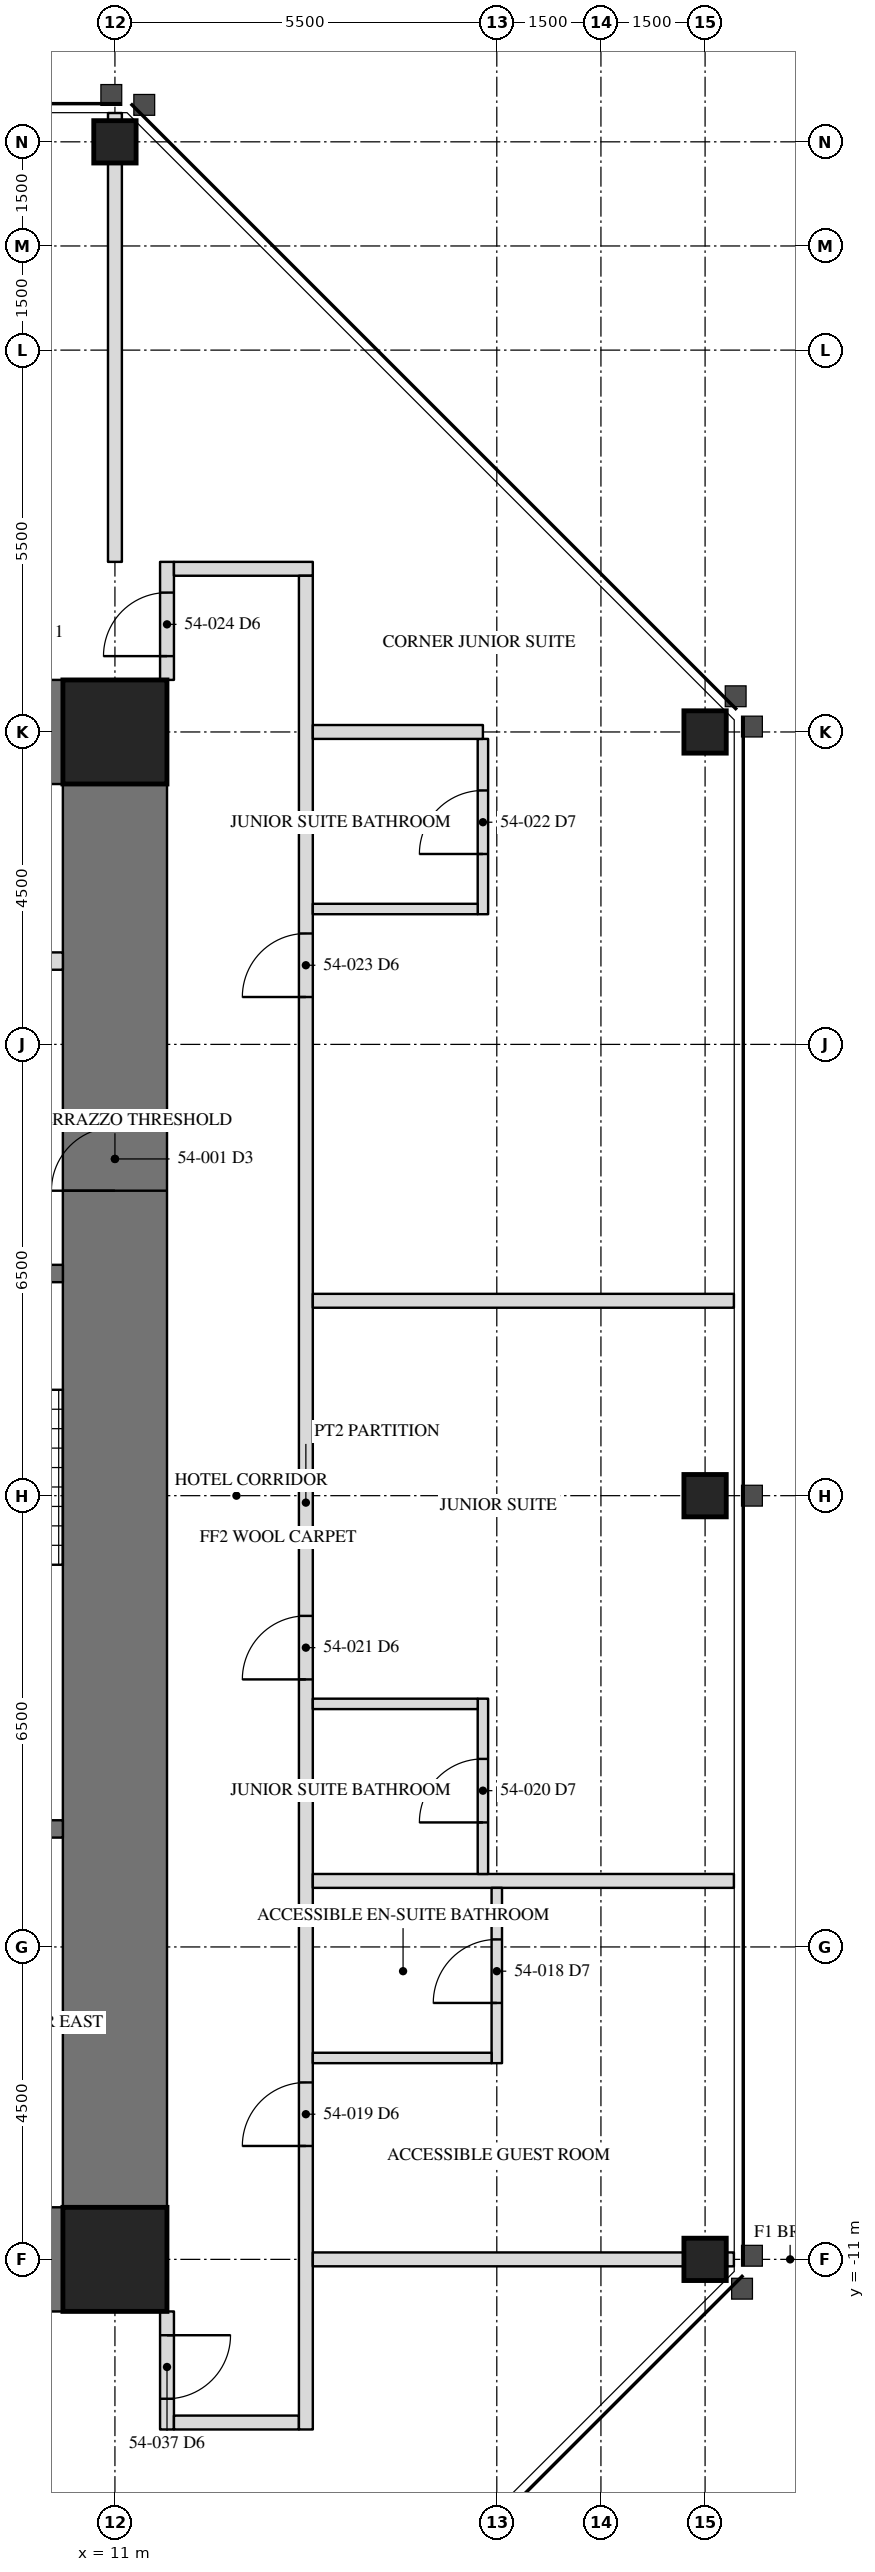
"""IFC4 building model, lengths in metres.
Left out: names, types, materials, properties, quantities, classifications, styles, units other than length and angle.
Written with IfcOpenShell. Run it as: python <this file> out.ifc"""

import sys

from ifc_helpers import new_model, si_unit, direction, frame, frame_2d, origin, origin_2d, place, context, subcontext, project, spatial, rectangle, hollow_rectangle, extrude, element, fill, save


model = new_model("IFC4")
c1 = context("Model", 3, precision=1e-05, world=origin(), true_north=direction((0.0, 1.0)))
c2 = subcontext(c1, "Body", "Model", "MODEL_VIEW")
j1 = project(units=[si_unit("LENGTHUNIT", "METRE"), si_unit("PLANEANGLEUNIT", "RADIAN")], contexts=[c1])
p1 = place(None, origin())
s1 = spatial("IfcSite", under=j1, at=p1, CompositionType="ELEMENT")
p2 = place(p1, origin())
s2 = spatial("IfcBuilding", under=s1, at=p2, CompositionType="ELEMENT")
p3 = place(p2, frame((0.0, 0.0, 225.7)))
s3 = spatial("IfcBuildingStorey", under=s2, at=p3, CompositionType="ELEMENT", Elevation=225.7)
for number, where, z_axis, x_axis in (
    (1, (19.5, -11.0, 0.0), (0.0, 0.0, 1.0), (0.0, 1.0, 0.0)),
    (2, (19.5, 0.0, 0.0), (0.0, 0.0, 1.0), (0.0, 1.0, 0.0)),
    (3, (19.5, 11.0, 0.0), (0.0, 0.0, 1.0), (0.0, 1.0, 0.0)),
    (4, (11.0, 19.5, 0.0), (0.0, 0.0, 1.0), (1.0, 0.0, 0.0)),
):
    element("IfcColumn", number, at=place(p3, frame(where, z_axis=z_axis, x_axis=x_axis)), inside=s3, PredefinedType="COLUMN", context=c2, shape_type="SweptSolid", body=[
        extrude(hollow_rectangle(XDim=0.61, YDim=0.61, WallThickness=0.076, at=origin_2d()), origin(), (0.0, 0.0, 1.0), 3.5),
    ])
p4 = place(p3, frame((11.0, -11.0, 0.0), z_axis=(0.0, 0.0, 1.0), x_axis=(0.0, 1.0, 0.0)))
e5 = element("IfcWall", 5, at=p4, inside=s3, PredefinedType="SHEAR", context=c2, shape_type="SweptSolid", body=[
    extrude(rectangle(XDim=22.0, YDim=1.5, at=frame_2d((11.0, 0.0))), origin(), (0.0, 0.0, 1.0), 3.5),
])
p5 = place(p4, frame((15.393, 0.0, 0.0)))
e6 = element("IfcOpeningElement", 6, at=p5, cuts=e5, PredefinedType="OPENING", context=c2, shape_type="SweptSolid", body=[
    extrude(rectangle(XDim=0.915, YDim=2.134, at=frame_2d((0.458, 1.067))), frame((0.0, 0.76, 0.0), z_axis=(0.0, -1.0, 0.0), x_axis=(1.0, 0.0, 0.0)), (0.0, 0.0, 1.0), 1.52),
])
for number, where, z_axis, x_axis in (
    (7, (11.0, 11.0, 0.0), (0.0, 0.0, 1.0), (-1.0, 0.0, 0.0)),
    (8, (6.5, -11.0, 0.0), (0.0, 0.0, 1.0), (1.0, 0.0, 0.0)),
):
    element("IfcWall", number, at=place(p3, frame(where, z_axis=z_axis, x_axis=x_axis)), inside=s3, PredefinedType="SHEAR", context=c2, shape_type="SweptSolid", body=[
        extrude(rectangle(XDim=4.5, YDim=1.5, at=frame_2d((2.25, 0.0))), origin(), (0.0, 0.0, 1.0), 3.5),
    ])
for number, where, z_axis, x_axis in (
    (9, (11.0, 11.0, 0.0), (0.0, 0.0, 1.0), (1.0, 0.0, 0.0)),
    (10, (11.0, -11.0, 0.0), (0.0, 0.0, 1.0), (1.0, 0.0, 0.0)),
):
    element("IfcColumn", number, at=place(p3, frame(where, z_axis=z_axis, x_axis=x_axis)), inside=s3, PredefinedType="COLUMN", context=c2, shape_type="SweptSolid", body=[
        extrude(hollow_rectangle(XDim=1.499, YDim=1.499, WallThickness=0.102, at=origin_2d()), origin(), (0.0, 0.0, 1.0), 3.5),
    ])
p6 = place(p3, frame((6.95, -4.8, 0.0), z_axis=(0.0, 0.0, 1.0), x_axis=(1.0, 0.0, 0.0)))
e11 = element("IfcWall", 11, at=p6, inside=s3, PredefinedType="SOLIDWALL", context=c2, shape_type="SweptSolid", body=[
    extrude(rectangle(XDim=3.3, YDim=0.25, at=frame_2d((1.65, 0.0))), origin(), (0.0, 0.0, 1.0), 3.31),
])
p7 = place(p3, frame((6.95, 3.2, 0.0), z_axis=(0.0, 0.0, 1.0), x_axis=(1.0, 0.0, 0.0)))
e12 = element("IfcWall", 12, at=p7, inside=s3, PredefinedType="SOLIDWALL", context=c2, shape_type="SweptSolid", body=[
    extrude(rectangle(XDim=3.3, YDim=0.25, at=frame_2d((1.65, 0.0))), origin(), (0.0, 0.0, 1.0), 3.31),
])
p8 = place(p7, frame((1.116, 0.0, 0.0)))
e13 = element("IfcOpeningElement", 13, at=p8, cuts=e12, PredefinedType="OPENING", context=c2, shape_type="SweptSolid", body=[
    extrude(rectangle(XDim=1.067, YDim=2.134, at=frame_2d((0.533, 1.067))), frame((0.0, 0.135, 0.0), z_axis=(0.0, -1.0, 0.0), x_axis=(1.0, 0.0, 0.0)), (0.0, 0.0, 1.0), 0.27),
])
p9 = place(p3, frame((6.95, 7.7, 0.0), z_axis=(0.0, 0.0, 1.0), x_axis=(1.0, 0.0, 0.0)))
e14 = element("IfcWall", 14, at=p9, inside=s3, PredefinedType="PARTITIONING", context=c2, shape_type="SweptSolid", body=[
    extrude(rectangle(XDim=3.3, YDim=0.25, at=frame_2d((1.65, 0.0))), origin(), (0.0, 0.0, 1.0), 3.31),
])
p10 = place(p9, frame((0.45, 0.0, 0.0)))
e15 = element("IfcOpeningElement", 15, at=p10, cuts=e14, PredefinedType="OPENING", context=c2, shape_type="SweptSolid", body=[
    extrude(rectangle(XDim=1.219, YDim=2.134, at=frame_2d((0.609, 1.067))), frame((0.0, 0.135, 0.0), z_axis=(0.0, -1.0, 0.0), x_axis=(1.0, 0.0, 0.0)), (0.0, 0.0, 1.0), 0.27),
])
p11 = place(p3, frame((11.75, 11.75, 0.0), z_axis=(0.0, 0.0, 1.0), x_axis=(0.0, 1.0, 0.0)))
e16 = element("IfcWall", 16, at=p11, inside=s3, PredefinedType="PARTITIONING", context=c2, shape_type="SweptSolid", body=[
    extrude(rectangle(XDim=1.7, YDim=0.2, at=frame_2d((0.85, 0.0))), origin(), (0.0, 0.0, 1.0), 3.31),
])
p12 = place(p11, frame((0.343, 0.0, 0.0)))
e17 = element("IfcOpeningElement", 17, at=p12, cuts=e16, PredefinedType="OPENING", context=c2, shape_type="SweptSolid", body=[
    extrude(rectangle(XDim=0.915, YDim=2.134, at=frame_2d((0.458, 1.067))), frame((0.0, 0.11, 0.0), z_axis=(0.0, -1.0, 0.0), x_axis=(1.0, 0.0, 0.0)), (0.0, 0.0, 1.0), 0.22),
])
p13 = place(p3, frame((13.85, 13.35, 0.0), z_axis=(0.0, 0.0, 1.0), x_axis=(-1.0, 0.0, 0.0)))
e18 = element("IfcWall", 18, at=p13, inside=s3, PredefinedType="PARTITIONING", context=c2, shape_type="SweptSolid", body=[
    extrude(rectangle(XDim=2.0, YDim=0.2, at=frame_2d((1.0, 0.0))), origin(), (0.0, 0.0, 1.0), 3.31),
])
p14 = place(p3, frame((11.75, -11.75, 0.0), z_axis=(0.0, 0.0, 1.0), x_axis=(0.0, -1.0, 0.0)))
e19 = element("IfcWall", 19, at=p14, inside=s3, PredefinedType="PARTITIONING", context=c2, shape_type="SweptSolid", body=[
    extrude(rectangle(XDim=1.7, YDim=0.2, at=frame_2d((0.85, 0.0))), origin(), (0.0, 0.0, 1.0), 3.31),
])
p15 = place(p14, frame((0.343, 0.0, 0.0)))
e20 = element("IfcOpeningElement", 20, at=p15, cuts=e19, PredefinedType="OPENING", context=c2, shape_type="SweptSolid", body=[
    extrude(rectangle(XDim=0.915, YDim=2.134, at=frame_2d((0.458, 1.067))), frame((0.0, 0.11, 0.0), z_axis=(0.0, -1.0, 0.0), x_axis=(1.0, 0.0, 0.0)), (0.0, 0.0, 1.0), 0.22),
])
p16 = place(p3, frame((11.85, -13.35, 0.0), z_axis=(0.0, 0.0, 1.0), x_axis=(1.0, 0.0, 0.0)))
e21 = element("IfcWall", 21, at=p16, inside=s3, PredefinedType="PARTITIONING", context=c2, shape_type="SweptSolid", body=[
    extrude(rectangle(XDim=1.8, YDim=0.2, at=frame_2d((0.9, 0.0))), origin(), (0.0, 0.0, 1.0), 3.31),
])
p17 = place(p3, frame((13.75, -13.45, 0.0), z_axis=(0.0, 0.0, 1.0), x_axis=(0.0, 1.0, 0.0)))
e22 = element("IfcWall", 22, at=p17, inside=s3, PredefinedType="PARTITIONING", context=c2, shape_type="SweptSolid", body=[
    extrude(rectangle(XDim=26.7, YDim=0.2, at=frame_2d((13.35, 0.0))), origin(), (0.0, 0.0, 1.0), 3.31),
])
p18 = place(p17, frame((4.083, 0.0, 0.0)))
e23 = element("IfcOpeningElement", 23, at=p18, cuts=e22, PredefinedType="OPENING", context=c2, shape_type="SweptSolid", body=[
    extrude(rectangle(XDim=0.915, YDim=2.134, at=frame_2d((0.458, 1.067))), frame((0.0, 0.11, 0.0), z_axis=(0.0, -1.0, 0.0), x_axis=(1.0, 0.0, 0.0)), (0.0, 0.0, 1.0), 0.22),
])
p19 = place(p17, frame((10.803, 0.0, 0.0)))
e24 = element("IfcOpeningElement", 24, at=p19, cuts=e22, PredefinedType="OPENING", context=c2, shape_type="SweptSolid", body=[
    extrude(rectangle(XDim=0.915, YDim=2.134, at=frame_2d((0.458, 1.067))), frame((0.0, 0.11, 0.0), z_axis=(0.0, -1.0, 0.0), x_axis=(1.0, 0.0, 0.0)), (0.0, 0.0, 1.0), 0.22),
])
p20 = place(p17, frame((20.633, 0.0, 0.0)))
e25 = element("IfcOpeningElement", 25, at=p20, cuts=e22, PredefinedType="OPENING", context=c2, shape_type="SweptSolid", body=[
    extrude(rectangle(XDim=0.915, YDim=2.134, at=frame_2d((0.458, 1.067))), frame((0.0, 0.11, 0.0), z_axis=(0.0, -1.0, 0.0), x_axis=(1.0, 0.0, 0.0)), (0.0, 0.0, 1.0), 0.22),
])
p21 = place(p3, frame((13.85, -11.0, 0.0), z_axis=(0.0, 0.0, 1.0), x_axis=(1.0, 0.0, 0.0)))
e26 = element("IfcWall", 26, at=p21, inside=s3, PredefinedType="PARTITIONING", context=c2, shape_type="SweptSolid", body=[
    extrude(rectangle(XDim=6.065, YDim=0.2, at=frame_2d((3.032, 0.0))), origin(), (0.0, 0.0, 1.0), 2.802),
])
for number, where, z_axis, x_axis in (
    (27, (13.85, -5.549, 0.0), (0.0, 0.0, 1.0), (1.0, 0.0, 0.0)),
    (28, (13.85, 2.807, 0.0), (0.0, 0.0, 1.0), (1.0, 0.0, 0.0)),
):
    element("IfcWall", number, at=place(p3, frame(where, z_axis=z_axis, x_axis=x_axis)), inside=s3, PredefinedType="PARTITIONING", context=c2, shape_type="SweptSolid", body=[
        extrude(rectangle(XDim=6.065, YDim=0.2, at=frame_2d((3.032, 0.0))), origin(), (0.0, 0.0, 1.0), 3.31),
    ])
p22 = place(p3, frame((16.5, -8.174, 0.0), z_axis=(0.0, 0.0, 1.0), x_axis=(0.0, 1.0, 0.0)))
e29 = element("IfcWall", 29, at=p22, inside=s3, PredefinedType="PARTITIONING", context=c2, shape_type="SweptSolid", body=[
    extrude(rectangle(XDim=2.525, YDim=0.15, at=frame_2d((1.263, 0.0))), origin(), (0.0, 0.0, 1.0), 3.31),
])
p23 = place(p22, frame((0.867, 0.0, 0.0)))
e30 = element("IfcOpeningElement", 30, at=p23, cuts=e29, PredefinedType="OPENING", context=c2, shape_type="SweptSolid", body=[
    extrude(rectangle(XDim=0.915, YDim=2.032, at=frame_2d((0.458, 1.016))), frame((0.0, 0.085, 0.0), z_axis=(0.0, -1.0, 0.0), x_axis=(1.0, 0.0, 0.0)), (0.0, 0.0, 1.0), 0.17),
])
p24 = place(p3, frame((13.85, -8.099, 0.0), z_axis=(0.0, 0.0, 1.0), x_axis=(1.0, 0.0, 0.0)))
e31 = element("IfcWall", 31, at=p24, inside=s3, PredefinedType="PARTITIONING", context=c2, shape_type="SweptSolid", body=[
    extrude(rectangle(XDim=2.575, YDim=0.15, at=frame_2d((1.288, 0.0))), origin(), (0.0, 0.0, 1.0), 3.31),
])
p25 = place(p3, frame((16.3, -5.449, 0.0), z_axis=(0.0, 0.0, 1.0), x_axis=(0.0, 1.0, 0.0)))
e32 = element("IfcWall", 32, at=p25, inside=s3, PredefinedType="PARTITIONING", context=c2, shape_type="SweptSolid", body=[
    extrude(rectangle(XDim=2.525, YDim=0.15, at=frame_2d((1.262, 0.0))), origin(), (0.0, 0.0, 1.0), 3.31),
])
p26 = place(p25, frame((0.742, 0.0, 0.0)))
e33 = element("IfcOpeningElement", 33, at=p26, cuts=e32, PredefinedType="OPENING", context=c2, shape_type="SweptSolid", body=[
    extrude(rectangle(XDim=0.915, YDim=2.032, at=frame_2d((0.458, 1.016))), frame((0.0, 0.085, 0.0), z_axis=(0.0, -1.0, 0.0), x_axis=(1.0, 0.0, 0.0)), (0.0, 0.0, 1.0), 0.17),
])
p27 = place(p3, frame((13.85, -2.999, 0.0), z_axis=(0.0, 0.0, 1.0), x_axis=(1.0, 0.0, 0.0)))
e34 = element("IfcWall", 34, at=p27, inside=s3, PredefinedType="PARTITIONING", context=c2, shape_type="SweptSolid", body=[
    extrude(rectangle(XDim=2.375, YDim=0.15, at=frame_2d((1.188, 0.0))), origin(), (0.0, 0.0, 1.0), 3.31),
])
p28 = place(p3, frame((16.3, 8.375, 0.0), z_axis=(0.0, 0.0, 1.0), x_axis=(0.0, 1.0, 0.0)))
e35 = element("IfcWall", 35, at=p28, inside=s3, PredefinedType="PARTITIONING", context=c2, shape_type="SweptSolid", body=[
    extrude(rectangle(XDim=2.525, YDim=0.15, at=frame_2d((1.262, 0.0))), origin(), (0.0, 0.0, 1.0), 3.31),
])
p29 = place(p28, frame((0.867, 0.0, 0.0)))
e36 = element("IfcOpeningElement", 36, at=p29, cuts=e35, PredefinedType="OPENING", context=c2, shape_type="SweptSolid", body=[
    extrude(rectangle(XDim=0.915, YDim=2.032, at=frame_2d((0.458, 1.016))), frame((0.0, 0.085, 0.0), z_axis=(0.0, -1.0, 0.0), x_axis=(1.0, 0.0, 0.0)), (0.0, 0.0, 1.0), 0.17),
])
p30 = place(p3, frame((13.85, 8.45, 0.0), z_axis=(0.0, 0.0, 1.0), x_axis=(1.0, 0.0, 0.0)))
e37 = element("IfcWall", 37, at=p30, inside=s3, PredefinedType="PARTITIONING", context=c2, shape_type="SweptSolid", body=[
    extrude(rectangle(XDim=2.375, YDim=0.15, at=frame_2d((1.188, 0.0))), origin(), (0.0, 0.0, 1.0), 3.31),
])
p31 = place(p3, frame((13.85, 11.0, 0.0), z_axis=(0.0, 0.0, 1.0), x_axis=(1.0, 0.0, 0.0)))
e38 = element("IfcWall", 38, at=p31, inside=s3, PredefinedType="PARTITIONING", context=c2, shape_type="SweptSolid", body=[
    extrude(rectangle(XDim=2.45, YDim=0.2, at=frame_2d((1.225, 0.0))), origin(), (0.0, 0.0, 1.0), 2.802),
])
p32 = place(p3, frame((11.0, 13.45, 0.0), z_axis=(0.0, 0.0, 1.0), x_axis=(0.0, 1.0, 0.0)))
e39 = element("IfcWall", 39, at=p32, inside=s3, PredefinedType="PARTITIONING", context=c2, shape_type="SweptSolid", body=[
    extrude(rectangle(XDim=6.465, YDim=0.2, at=frame_2d((3.232, 0.0))), origin(), (0.0, 0.0, 1.0), 2.802),
])
p33 = place(p5, origin())
e40 = element("IfcDoor", 40, at=p33, inside=s3, OperationType="SINGLE_SWING_RIGHT", PredefinedType="DOOR", context=c2, shape_type="SweptSolid", body=[
    extrude(rectangle(XDim=0.915, YDim=2.134, at=frame_2d((0.458, 1.067))), frame((0.0, -0.675, 0.0), z_axis=(0.0, -1.0, 0.0), x_axis=(1.0, 0.0, 0.0)), (0.0, 0.0, 1.0), 0.05),
])
fill(e6, e40)
p34 = place(p23, origin())
e41 = element("IfcDoor", 41, at=p34, inside=s3, OperationType="SINGLE_SWING_LEFT", PredefinedType="DOOR", context=c2, shape_type="SweptSolid", body=[
    extrude(rectangle(XDim=0.915, YDim=2.032, at=frame_2d((0.458, 1.016))), frame((0.0, 0.025, 0.0), z_axis=(0.0, -1.0, 0.0), x_axis=(1.0, 0.0, 0.0)), (0.0, 0.0, 1.0), 0.05),
])
fill(e30, e41)
p35 = place(p18, origin())
e42 = element("IfcDoor", 42, at=p35, inside=s3, OperationType="SINGLE_SWING_LEFT", PredefinedType="DOOR", context=c2, shape_type="SweptSolid", body=[
    extrude(rectangle(XDim=0.915, YDim=2.134, at=frame_2d((0.458, 1.067))), frame((0.0, 0.025, 0.0), z_axis=(0.0, -1.0, 0.0), x_axis=(1.0, 0.0, 0.0)), (0.0, 0.0, 1.0), 0.05),
])
fill(e23, e42)
p36 = place(p26, origin())
e43 = element("IfcDoor", 43, at=p36, inside=s3, OperationType="SINGLE_SWING_LEFT", PredefinedType="DOOR", context=c2, shape_type="SweptSolid", body=[
    extrude(rectangle(XDim=0.915, YDim=2.032, at=frame_2d((0.458, 1.016))), frame((0.0, 0.025, 0.0), z_axis=(0.0, -1.0, 0.0), x_axis=(1.0, 0.0, 0.0)), (0.0, 0.0, 1.0), 0.05),
])
fill(e33, e43)
p37 = place(p19, origin())
e44 = element("IfcDoor", 44, at=p37, inside=s3, OperationType="SINGLE_SWING_LEFT", PredefinedType="DOOR", context=c2, shape_type="SweptSolid", body=[
    extrude(rectangle(XDim=0.915, YDim=2.134, at=frame_2d((0.458, 1.067))), frame((0.0, 0.025, 0.0), z_axis=(0.0, -1.0, 0.0), x_axis=(1.0, 0.0, 0.0)), (0.0, 0.0, 1.0), 0.05),
])
fill(e24, e44)
p38 = place(p29, origin())
e45 = element("IfcDoor", 45, at=p38, inside=s3, OperationType="SINGLE_SWING_LEFT", PredefinedType="DOOR", context=c2, shape_type="SweptSolid", body=[
    extrude(rectangle(XDim=0.915, YDim=2.032, at=frame_2d((0.458, 1.016))), frame((0.0, 0.025, 0.0), z_axis=(0.0, -1.0, 0.0), x_axis=(1.0, 0.0, 0.0)), (0.0, 0.0, 1.0), 0.05),
])
fill(e36, e45)
p39 = place(p20, origin())
e46 = element("IfcDoor", 46, at=p39, inside=s3, OperationType="SINGLE_SWING_LEFT", PredefinedType="DOOR", context=c2, shape_type="SweptSolid", body=[
    extrude(rectangle(XDim=0.915, YDim=2.134, at=frame_2d((0.458, 1.067))), frame((0.0, 0.025, 0.0), z_axis=(0.0, -1.0, 0.0), x_axis=(1.0, 0.0, 0.0)), (0.0, 0.0, 1.0), 0.05),
])
fill(e25, e46)
p40 = place(p12, origin())
e47 = element("IfcDoor", 47, at=p40, inside=s3, OperationType="SINGLE_SWING_LEFT", PredefinedType="DOOR", context=c2, shape_type="SweptSolid", body=[
    extrude(rectangle(XDim=0.915, YDim=2.134, at=frame_2d((0.458, 1.067))), frame((0.0, 0.025, 0.0), z_axis=(0.0, -1.0, 0.0), x_axis=(1.0, 0.0, 0.0)), (0.0, 0.0, 1.0), 0.05),
])
fill(e17, e47)
p41 = place(p15, origin())
e48 = element("IfcDoor", 48, at=p41, inside=s3, OperationType="SINGLE_SWING_LEFT", PredefinedType="DOOR", context=c2, shape_type="SweptSolid", body=[
    extrude(rectangle(XDim=0.915, YDim=2.134, at=frame_2d((0.458, 1.067))), frame((0.0, 0.025, 0.0), z_axis=(0.0, -1.0, 0.0), x_axis=(1.0, 0.0, 0.0)), (0.0, 0.0, 1.0), 0.05),
])
fill(e20, e48)
save(model, sys.argv[1])
